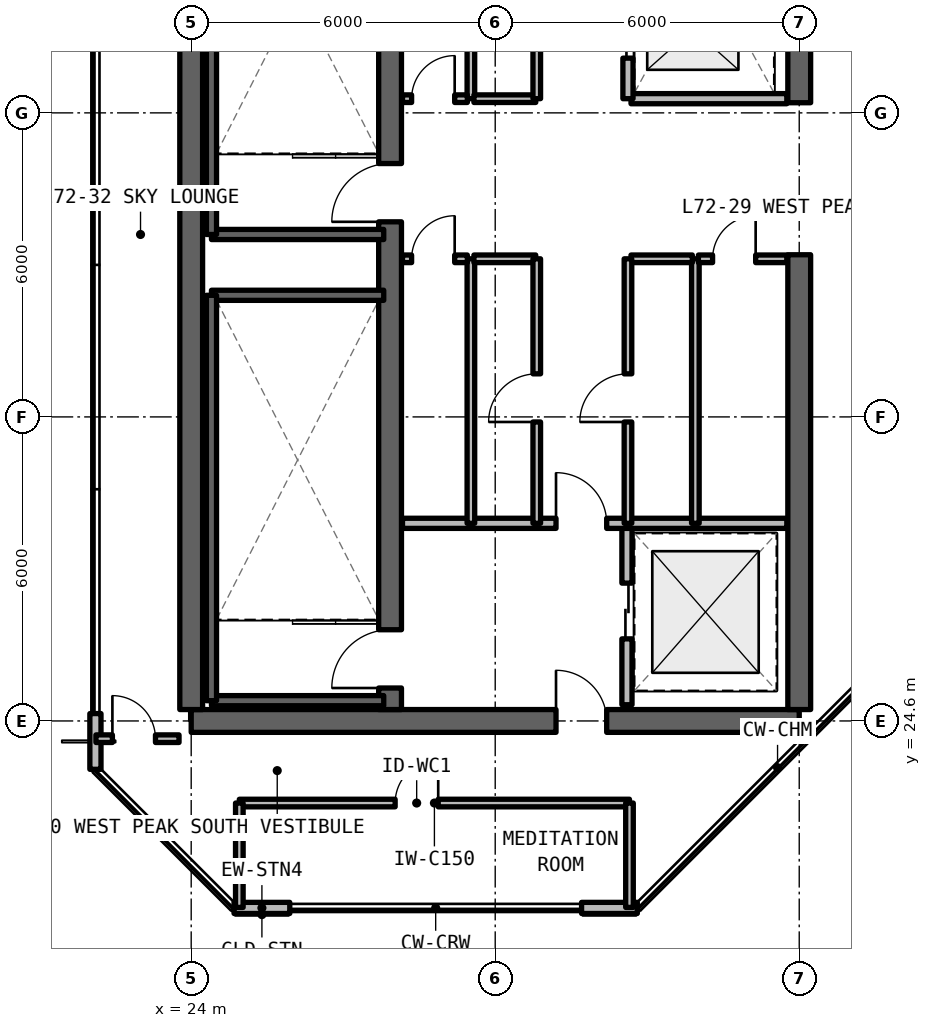
"""IFC4 building model, lengths in metres.
Left out: names, types, materials, properties, quantities, classifications, styles, units other than length and angle.
Written with IfcOpenShell. Run it as: python <this file> out.ifc"""

import sys

from ifc_helpers import new_model, si_unit, direction, frame, frame_2d, origin, place, context, subcontext, project, spatial, rectangle, extrude, element, fill, save


model = new_model("IFC4")
c1 = context("Model", 3, precision=1e-05, world=origin(), true_north=direction((0.0, 1.0)))
c2 = subcontext(c1, "Body", "Model", "MODEL_VIEW")
j1 = project(units=[si_unit("LENGTHUNIT", "METRE"), si_unit("PLANEANGLEUNIT", "RADIAN")], contexts=[c1])
p1 = place(None, origin())
s1 = spatial("IfcSite", under=j1, at=p1, CompositionType="ELEMENT")
p2 = place(p1, origin())
s2 = spatial("IfcBuilding", under=s1, at=p2, CompositionType="ELEMENT")
p3 = place(p2, frame((0.0, 0.0, 257.07)))
s3 = spatial("IfcBuildingStorey", under=s2, at=p3, CompositionType="ELEMENT", Elevation=257.07)
p4 = place(p3, frame((24.0, 24.6, 0.0), z_axis=(0.0, 0.0, 1.0), x_axis=(1.0, 0.0, 0.0)))
e1 = element("IfcWall", 1, at=p4, inside=s3, PredefinedType="SHEAR", context=c2, shape_type="SweptSolid", body=[
    extrude(rectangle(XDim=12.0, YDim=0.45, at=frame_2d((6.0, 0.0))), origin(), (0.0, 0.0, 1.0), 3.37),
])
p5 = place(p4, frame((7.2, 0.0, 0.0)))
e2 = element("IfcOpeningElement", 2, at=p5, cuts=e1, PredefinedType="OPENING", context=c2, shape_type="SweptSolid", body=[
    extrude(rectangle(XDim=1.0, YDim=2.15, at=frame_2d((0.5, 1.075))), frame((0.0, 0.235, 0.0), z_axis=(0.0, -1.0, 0.0), x_axis=(1.0, 0.0, 0.0)), (0.0, 0.0, 1.0), 0.47),
])
p6 = place(p3, frame((24.0, 24.825, 0.0), z_axis=(0.0, 0.0, 1.0), x_axis=(0.0, 1.0, 0.0)))
e3 = element("IfcWall", 3, at=p6, inside=s3, PredefinedType="SHEAR", context=c2, shape_type="SweptSolid", body=[
    extrude(rectangle(XDim=17.55, YDim=0.45, at=frame_2d((8.775, 0.0))), origin(), (0.0, 0.0, 1.0), 3.37),
])
p7 = place(p3, frame((36.0, 24.825, 0.0), z_axis=(0.0, 0.0, 1.0), x_axis=(0.0, 1.0, 0.0)))
e4 = element("IfcWall", 4, at=p7, inside=s3, PredefinedType="SHEAR", context=c2, shape_type="SweptSolid", body=[
    extrude(rectangle(XDim=8.975, YDim=0.45, at=frame_2d((4.488, 0.0))), origin(), (0.0, 0.0, 1.0), 3.37),
])
p8 = place(p3, frame((36.0, 36.8, 0.0), z_axis=(0.0, 0.0, 1.0), x_axis=(0.0, 1.0, 0.0)))
e5 = element("IfcWall", 5, at=p8, inside=s3, PredefinedType="SHEAR", context=c2, shape_type="SweptSolid", body=[
    extrude(rectangle(XDim=5.575, YDim=0.45, at=frame_2d((2.788, 0.0))), origin(), (0.0, 0.0, 1.0), 3.37),
])
p9 = place(p3, frame((27.925, 24.825, 0.0), z_axis=(0.0, 0.0, 1.0), x_axis=(0.0, 1.0, 0.0)))
e6 = element("IfcWall", 6, at=p9, inside=s3, PredefinedType="SHEAR", context=c2, shape_type="SweptSolid", body=[
    extrude(rectangle(XDim=17.55, YDim=0.45, at=frame_2d((8.775, 0.0))), origin(), (0.0, 0.0, 1.0), 3.37),
])
p10 = place(p9, frame((0.425, 0.0, 0.0)))
e7 = element("IfcOpeningElement", 7, at=p10, cuts=e6, PredefinedType="OPENING", context=c2, shape_type="SweptSolid", body=[
    extrude(rectangle(XDim=1.15, YDim=2.15, at=frame_2d((0.575, 1.075))), frame((0.0, 0.235, 0.0), z_axis=(0.0, -1.0, 0.0), x_axis=(1.0, 0.0, 0.0)), (0.0, 0.0, 1.0), 0.47),
])
p11 = place(p9, frame((9.625, 0.0, 0.0)))
e8 = element("IfcOpeningElement", 8, at=p11, cuts=e6, PredefinedType="OPENING", context=c2, shape_type="SweptSolid", body=[
    extrude(rectangle(XDim=1.15, YDim=2.15, at=frame_2d((0.575, 1.075))), frame((0.0, 0.235, 0.0), z_axis=(0.0, -1.0, 0.0), x_axis=(1.0, 0.0, 0.0)), (0.0, 0.0, 1.0), 0.47),
])
p12 = place(p3, frame((24.846, 20.91, 0.0), z_axis=(0.0, 0.0, 1.0), x_axis=(1.0, 0.0, 0.0)))
e9 = element("IfcWall", 9, at=p12, inside=s3, PredefinedType="SOLIDWALL", context=c2, shape_type="SweptSolid", body=[
    extrude(rectangle(XDim=1.1, YDim=0.22, at=frame_2d((0.55, 0.0))), origin(), (0.0, 0.0, 1.0), 3.41),
])
for number, where, z_axis, x_axis in (
    (10, (31.704, 20.91, 0.0), (0.0, 0.0, 1.0), (1.0, 0.0, 0.0)),
    (11, (22.11, 24.746, 0.0), (0.0, 0.0, 1.0), (0.0, -1.0, 0.0)),
):
    element("IfcWall", number, at=place(p3, frame(where, z_axis=z_axis, x_axis=x_axis)), inside=s3, PredefinedType="SOLIDWALL", context=c2, shape_type="SweptSolid", body=[
        extrude(rectangle(XDim=1.1, YDim=0.22, at=frame_2d((0.55, 0.0))), origin(), (0.0, 0.0, 1.0), 3.41),
    ])
p13 = place(p3, frame((32.6, 24.92, 0.0), z_axis=(0.0, 0.0, 1.0), x_axis=(0.0, 1.0, 0.0)))
e12 = element("IfcWall", 12, at=p13, inside=s3, PredefinedType="SOLIDWALL", context=c2, shape_type="SweptSolid", body=[
    extrude(rectangle(XDim=3.58, YDim=0.2, at=frame_2d((1.79, 0.0))), origin(), (0.0, 0.0, 1.0), 2.63),
])
p14 = place(p13, frame((1.3, 0.0, 0.0)))
e13 = element("IfcOpeningElement", 13, at=p14, cuts=e12, PredefinedType="OPENING", context=c2, shape_type="SweptSolid", body=[
    extrude(rectangle(XDim=1.1, YDim=2.2, at=frame_2d((0.55, 1.1))), frame((0.0, 0.11, 0.0), z_axis=(0.0, -1.0, 0.0), x_axis=(1.0, 0.0, 0.0)), (0.0, 0.0, 1.0), 0.22),
])
p15 = place(p3, frame((28.17, 28.5, 0.0), z_axis=(0.0, 0.0, 1.0), x_axis=(1.0, 0.0, 0.0)))
e14 = element("IfcWall", 14, at=p15, inside=s3, PredefinedType="SOLIDWALL", context=c2, shape_type="SweptSolid", body=[
    extrude(rectangle(XDim=7.585, YDim=0.2, at=frame_2d((3.792, 0.0))), origin(), (0.0, 0.0, 1.0), 2.63),
])
p16 = place(p15, frame((3.03, 0.0, 0.0)))
e15 = element("IfcOpeningElement", 15, at=p16, cuts=e14, PredefinedType="OPENING", context=c2, shape_type="SweptSolid", body=[
    extrude(rectangle(XDim=1.0, YDim=2.15, at=frame_2d((0.5, 1.075))), frame((0.0, 0.11, 0.0), z_axis=(0.0, -1.0, 0.0), x_axis=(1.0, 0.0, 0.0)), (0.0, 0.0, 1.0), 0.22),
])
p17 = place(p3, frame((29.52, 28.5, 0.0), z_axis=(0.0, 0.0, 1.0), x_axis=(0.0, 1.0, 0.0)))
e16 = element("IfcWall", 16, at=p17, inside=s3, PredefinedType="SOLIDWALL", context=c2, shape_type="SweptSolid", body=[
    extrude(rectangle(XDim=5.22, YDim=0.15, at=frame_2d((2.61, 0.0))), origin(), (0.0, 0.0, 1.0), 2.63),
])
p18 = place(p3, frame((28.17, 33.72, 0.0), z_axis=(0.0, 0.0, 1.0), x_axis=(1.0, 0.0, 0.0)))
e17 = element("IfcWall", 17, at=p18, inside=s3, PredefinedType="SOLIDWALL", context=c2, shape_type="SweptSolid", body=[
    extrude(rectangle(XDim=1.28, YDim=0.15, at=frame_2d((0.64, 0.0))), origin(), (0.0, 0.0, 1.0), 2.63),
])
p19 = place(p18, frame((0.18, 0.0, 0.0)))
e18 = element("IfcOpeningElement", 18, at=p19, cuts=e17, PredefinedType="OPENING", context=c2, shape_type="SweptSolid", body=[
    extrude(rectangle(XDim=0.85, YDim=2.1, at=frame_2d((0.425, 1.05))), frame((0.0, 0.085, 0.0), z_axis=(0.0, -1.0, 0.0), x_axis=(1.0, 0.0, 0.0)), (0.0, 0.0, 1.0), 0.17),
])
p20 = place(p3, frame((29.58, 33.72, 0.0), z_axis=(0.0, 0.0, 1.0), x_axis=(1.0, 0.0, 0.0)))
e19 = element("IfcWall", 19, at=p20, inside=s3, PredefinedType="SOLIDWALL", context=c2, shape_type="SweptSolid", body=[
    extrude(rectangle(XDim=1.22, YDim=0.15, at=frame_2d((0.61, 0.0))), origin(), (0.0, 0.0, 1.0), 2.63),
])
p21 = place(p3, frame((30.82, 28.5, 0.0), z_axis=(0.0, 0.0, 1.0), x_axis=(0.0, 1.0, 0.0)))
e20 = element("IfcWall", 20, at=p21, inside=s3, PredefinedType="SOLIDWALL", context=c2, shape_type="SweptSolid", body=[
    extrude(rectangle(XDim=5.22, YDim=0.15, at=frame_2d((2.61, 0.0))), origin(), (0.0, 0.0, 1.0), 2.63),
])
p22 = place(p21, frame((2.0, 0.0, 0.0)))
e21 = element("IfcOpeningElement", 21, at=p22, cuts=e20, PredefinedType="OPENING", context=c2, shape_type="SweptSolid", body=[
    extrude(rectangle(XDim=0.95, YDim=2.15, at=frame_2d((0.475, 1.075))), frame((0.0, 0.085, 0.0), z_axis=(0.0, -1.0, 0.0), x_axis=(1.0, 0.0, 0.0)), (0.0, 0.0, 1.0), 0.17),
])
p23 = place(p3, frame((33.95, 28.5, 0.0), z_axis=(0.0, 0.0, 1.0), x_axis=(0.0, 1.0, 0.0)))
e22 = element("IfcWall", 22, at=p23, inside=s3, PredefinedType="SOLIDWALL", context=c2, shape_type="SweptSolid", body=[
    extrude(rectangle(XDim=5.22, YDim=0.15, at=frame_2d((2.61, 0.0))), origin(), (0.0, 0.0, 1.0), 2.63),
])
p24 = place(p3, frame((32.68, 33.72, 0.0), z_axis=(0.0, 0.0, 1.0), x_axis=(1.0, 0.0, 0.0)))
e23 = element("IfcWall", 23, at=p24, inside=s3, PredefinedType="SOLIDWALL", context=c2, shape_type="SweptSolid", body=[
    extrude(rectangle(XDim=1.21, YDim=0.15, at=frame_2d((0.605, 0.0))), origin(), (0.0, 0.0, 1.0), 2.63),
])
p25 = place(p3, frame((34.01, 33.72, 0.0), z_axis=(0.0, 0.0, 1.0), x_axis=(1.0, 0.0, 0.0)))
e24 = element("IfcWall", 24, at=p25, inside=s3, PredefinedType="SOLIDWALL", context=c2, shape_type="SweptSolid", body=[
    extrude(rectangle(XDim=1.745, YDim=0.15, at=frame_2d((0.873, 0.0))), origin(), (0.0, 0.0, 1.0), 2.63),
])
p26 = place(p25, frame((0.28, 0.0, 0.0)))
e25 = element("IfcOpeningElement", 25, at=p26, cuts=e24, PredefinedType="OPENING", context=c2, shape_type="SweptSolid", body=[
    extrude(rectangle(XDim=0.85, YDim=2.1, at=frame_2d((0.425, 1.05))), frame((0.0, 0.085, 0.0), z_axis=(0.0, -1.0, 0.0), x_axis=(1.0, 0.0, 0.0)), (0.0, 0.0, 1.0), 0.17),
])
p27 = place(p3, frame((32.62, 28.5, 0.0), z_axis=(0.0, 0.0, 1.0), x_axis=(0.0, 1.0, 0.0)))
e26 = element("IfcWall", 26, at=p27, inside=s3, PredefinedType="SOLIDWALL", context=c2, shape_type="SweptSolid", body=[
    extrude(rectangle(XDim=5.22, YDim=0.15, at=frame_2d((2.61, 0.0))), origin(), (0.0, 0.0, 1.0), 2.63),
])
p28 = place(p27, frame((2.0, 0.0, 0.0)))
e27 = element("IfcOpeningElement", 27, at=p28, cuts=e26, PredefinedType="OPENING", context=c2, shape_type="SweptSolid", body=[
    extrude(rectangle(XDim=0.95, YDim=2.15, at=frame_2d((0.475, 1.075))), frame((0.0, 0.085, 0.0), z_axis=(0.0, -1.0, 0.0), x_axis=(1.0, 0.0, 0.0)), (0.0, 0.0, 1.0), 0.17),
])
p29 = place(p3, frame((29.52, 36.88, 0.0), z_axis=(0.0, 0.0, 1.0), x_axis=(0.0, 1.0, 0.0)))
e28 = element("IfcWall", 28, at=p29, inside=s3, PredefinedType="SOLIDWALL", context=c2, shape_type="SweptSolid", body=[
    extrude(rectangle(XDim=5.42, YDim=0.15, at=frame_2d((2.71, 0.0))), origin(), (0.0, 0.0, 1.0), 2.63),
])
p30 = place(p3, frame((28.17, 36.88, 0.0), z_axis=(0.0, 0.0, 1.0), x_axis=(1.0, 0.0, 0.0)))
e29 = element("IfcWall", 29, at=p30, inside=s3, PredefinedType="SOLIDWALL", context=c2, shape_type="SweptSolid", body=[
    extrude(rectangle(XDim=1.28, YDim=0.15, at=frame_2d((0.64, 0.0))), origin(), (0.0, 0.0, 1.0), 2.63),
])
p31 = place(p30, frame((0.18, 0.0, 0.0)))
e30 = element("IfcOpeningElement", 30, at=p31, cuts=e29, PredefinedType="OPENING", context=c2, shape_type="SweptSolid", body=[
    extrude(rectangle(XDim=0.85, YDim=2.1, at=frame_2d((0.425, 1.05))), frame((0.0, 0.085, 0.0), z_axis=(0.0, -1.0, 0.0), x_axis=(1.0, 0.0, 0.0)), (0.0, 0.0, 1.0), 0.17),
])
p32 = place(p3, frame((29.58, 36.88, 0.0), z_axis=(0.0, 0.0, 1.0), x_axis=(1.0, 0.0, 0.0)))
e31 = element("IfcWall", 31, at=p32, inside=s3, PredefinedType="SOLIDWALL", context=c2, shape_type="SweptSolid", body=[
    extrude(rectangle(XDim=1.22, YDim=0.15, at=frame_2d((0.61, 0.0))), origin(), (0.0, 0.0, 1.0), 2.63),
])
p33 = place(p3, frame((30.82, 36.88, 0.0), z_axis=(0.0, 0.0, 1.0), x_axis=(0.0, 1.0, 0.0)))
e32 = element("IfcWall", 32, at=p33, inside=s3, PredefinedType="SOLIDWALL", context=c2, shape_type="SweptSolid", body=[
    extrude(rectangle(XDim=5.42, YDim=0.15, at=frame_2d((2.71, 0.0))), origin(), (0.0, 0.0, 1.0), 2.63),
])
p34 = place(p33, frame((2.1, 0.0, 0.0)))
e33 = element("IfcOpeningElement", 33, at=p34, cuts=e32, PredefinedType="OPENING", context=c2, shape_type="SweptSolid", body=[
    extrude(rectangle(XDim=0.95, YDim=2.15, at=frame_2d((0.475, 1.075))), frame((0.0, 0.085, 0.0), z_axis=(0.0, -1.0, 0.0), x_axis=(1.0, 0.0, 0.0)), (0.0, 0.0, 1.0), 0.17),
])
p35 = place(p3, frame((32.68, 36.88, 0.0), z_axis=(0.0, 0.0, 1.0), x_axis=(1.0, 0.0, 0.0)))
e34 = element("IfcWall", 34, at=p35, inside=s3, PredefinedType="SOLIDWALL", context=c2, shape_type="SweptSolid", body=[
    extrude(rectangle(XDim=3.075, YDim=0.2, at=frame_2d((1.538, 0.0))), origin(), (0.0, 0.0, 1.0), 2.63),
])
p36 = place(p3, frame((32.62, 36.88, 0.0), z_axis=(0.0, 0.0, 1.0), x_axis=(0.0, 1.0, 0.0)))
e35 = element("IfcWall", 35, at=p36, inside=s3, PredefinedType="SOLIDWALL", context=c2, shape_type="SweptSolid", body=[
    extrude(rectangle(XDim=5.42, YDim=0.2, at=frame_2d((2.71, 0.0))), origin(), (0.0, 0.0, 1.0), 2.63),
])
p37 = place(p36, frame((0.8, 0.0, 0.0)))
e36 = element("IfcOpeningElement", 36, at=p37, cuts=e35, PredefinedType="OPENING", context=c2, shape_type="SweptSolid", body=[
    extrude(rectangle(XDim=1.1, YDim=2.2, at=frame_2d((0.55, 1.1))), frame((0.0, 0.11, 0.0), z_axis=(0.0, -1.0, 0.0), x_axis=(1.0, 0.0, 0.0)), (0.0, 0.0, 1.0), 0.22),
])
p38 = place(p36, frame((3.3, 0.0, 0.0)))
e37 = element("IfcOpeningElement", 37, at=p38, cuts=e35, PredefinedType="OPENING", context=c2, shape_type="SweptSolid", body=[
    extrude(rectangle(XDim=1.1, YDim=2.2, at=frame_2d((0.55, 1.1))), frame((0.0, 0.11, 0.0), z_axis=(0.0, -1.0, 0.0), x_axis=(1.0, 0.0, 0.0)), (0.0, 0.0, 1.0), 0.22),
])
p39 = place(p3, frame((24.95, 22.98, 0.0), z_axis=(0.0, 0.0, 1.0), x_axis=(1.0, 0.0, 0.0)))
e38 = element("IfcWall", 38, at=p39, inside=s3, PredefinedType="SOLIDWALL", context=c2, shape_type="SweptSolid", body=[
    extrude(rectangle(XDim=7.7, YDim=0.15, at=frame_2d((3.85, 0.0))), origin(), (0.0, 0.0, 1.0), 2.63),
])
p40 = place(p39, frame((3.075, 0.0, 0.0)))
e39 = element("IfcOpeningElement", 39, at=p40, cuts=e38, PredefinedType="OPENING", context=c2, shape_type="SweptSolid", body=[
    extrude(rectangle(XDim=0.85, YDim=2.1, at=frame_2d((0.425, 1.05))), frame((0.0, 0.085, 0.0), z_axis=(0.0, -1.0, 0.0), x_axis=(1.0, 0.0, 0.0)), (0.0, 0.0, 1.0), 0.17),
])
for number, where, z_axis, x_axis in (
    (40, (24.95, 20.92, 0.0), (0.0, 0.0, 1.0), (0.0, 1.0, 0.0)),
    (41, (32.65, 20.92, 0.0), (0.0, 0.0, 1.0), (0.0, 1.0, 0.0)),
):
    element("IfcWall", number, at=place(p3, frame(where, z_axis=z_axis, x_axis=x_axis)), inside=s3, PredefinedType="SOLIDWALL", context=c2, shape_type="SweptSolid", body=[
        extrude(rectangle(XDim=2.06, YDim=0.15, at=frame_2d((1.03, 0.0))), origin(), (0.0, 0.0, 1.0), 2.63),
    ])
p41 = place(p3, frame((22.12, 24.25, 0.0), z_axis=(0.0, 0.0, 1.0), x_axis=(1.0, 0.0, 0.0)))
e42 = element("IfcWall", 42, at=p41, inside=s3, PredefinedType="SOLIDWALL", context=c2, shape_type="SweptSolid", body=[
    extrude(rectangle(XDim=1.64, YDim=0.15, at=frame_2d((0.82, 0.0))), origin(), (0.0, 0.0, 1.0), 2.63),
])
p42 = place(p41, frame((0.325, 0.0, 0.0)))
e43 = element("IfcOpeningElement", 43, at=p42, cuts=e42, PredefinedType="OPENING", context=c2, shape_type="SweptSolid", body=[
    extrude(rectangle(XDim=0.85, YDim=2.1, at=frame_2d((0.425, 1.05))), frame((0.0, 0.085, 0.0), z_axis=(0.0, -1.0, 0.0), x_axis=(1.0, 0.0, 0.0)), (0.0, 0.0, 1.0), 0.17),
])
for number, where, z_axis, x_axis in (
    (44, (24.4, 25.0, 0.0), (0.0, 0.0, 1.0), (1.0, 0.0, 0.0)),
    (45, (27.8, 33.0, 0.0), (0.0, 0.0, 1.0), (-1.0, 0.0, 0.0)),
):
    element("IfcWall", number, at=place(p3, frame(where, z_axis=z_axis, x_axis=x_axis)), inside=s3, PredefinedType="SOLIDWALL", context=c2, shape_type="SweptSolid", body=[
        extrude(rectangle(XDim=3.4, YDim=0.2, at=frame_2d((1.7, 0.0))), origin(), (0.0, 0.0, 1.0), 3.63),
    ])
p43 = place(p3, frame((24.4, 33.0, 0.0), z_axis=(0.0, 0.0, 1.0), x_axis=(0.0, -1.0, 0.0)))
e46 = element("IfcWall", 46, at=p43, inside=s3, PredefinedType="SOLIDWALL", context=c2, shape_type="SweptSolid", body=[
    extrude(rectangle(XDim=8.0, YDim=0.2, at=frame_2d((4.0, 0.0))), origin(), (0.0, 0.0, 1.0), 3.63),
])
p44 = place(p3, frame((24.4, 34.2, 0.0), z_axis=(0.0, 0.0, 1.0), x_axis=(1.0, 0.0, 0.0)))
e47 = element("IfcWall", 47, at=p44, inside=s3, PredefinedType="SOLIDWALL", context=c2, shape_type="SweptSolid", body=[
    extrude(rectangle(XDim=3.4, YDim=0.2, at=frame_2d((1.7, 0.0))), origin(), (0.0, 0.0, 1.0), 3.63),
])
p45 = place(p3, frame((24.4, 42.2, 0.0), z_axis=(0.0, 0.0, 1.0), x_axis=(0.0, -1.0, 0.0)))
e48 = element("IfcWall", 48, at=p45, inside=s3, PredefinedType="SOLIDWALL", context=c2, shape_type="SweptSolid", body=[
    extrude(rectangle(XDim=8.0, YDim=0.2, at=frame_2d((4.0, 0.0))), origin(), (0.0, 0.0, 1.0), 3.63),
])
p46 = place(p14, origin())
e49 = element("IfcDoor", 49, at=p46, inside=s3, OperationType="SLIDING_TO_LEFT", PredefinedType="DOOR", context=c2, shape_type="SweptSolid", body=[
    extrude(rectangle(XDim=1.1, YDim=2.2, at=frame_2d((0.55, 1.1))), frame((0.0, 0.025, 0.0), z_axis=(0.0, -1.0, 0.0), x_axis=(1.0, 0.0, 0.0)), (0.0, 0.0, 1.0), 0.05),
])
fill(e13, e49)
p47 = place(p16, origin())
e50 = element("IfcDoor", 50, at=p47, inside=s3, OperationType="SINGLE_SWING_LEFT", PredefinedType="DOOR", context=c2, shape_type="SweptSolid", body=[
    extrude(rectangle(XDim=1.0, YDim=2.15, at=frame_2d((0.5, 1.075))), frame((0.0, 0.025, 0.0), z_axis=(0.0, -1.0, 0.0), x_axis=(1.0, 0.0, 0.0)), (0.0, 0.0, 1.0), 0.05),
])
fill(e15, e50)
p48 = place(p19, origin())
e51 = element("IfcDoor", 51, at=p48, inside=s3, OperationType="SINGLE_SWING_RIGHT", PredefinedType="DOOR", context=c2, shape_type="SweptSolid", body=[
    extrude(rectangle(XDim=0.85, YDim=2.1, at=frame_2d((0.425, 1.05))), frame((0.0, 0.025, 0.0), z_axis=(0.0, -1.0, 0.0), x_axis=(1.0, 0.0, 0.0)), (0.0, 0.0, 1.0), 0.05),
])
fill(e18, e51)
p49 = place(p22, origin())
e52 = element("IfcDoor", 52, at=p49, inside=s3, OperationType="SINGLE_SWING_LEFT", PredefinedType="DOOR", context=c2, shape_type="SweptSolid", body=[
    extrude(rectangle(XDim=0.95, YDim=2.15, at=frame_2d((0.475, 1.075))), frame((0.0, 0.025, 0.0), z_axis=(0.0, -1.0, 0.0), x_axis=(1.0, 0.0, 0.0)), (0.0, 0.0, 1.0), 0.05),
])
fill(e21, e52)
p50 = place(p26, origin())
e53 = element("IfcDoor", 53, at=p50, inside=s3, OperationType="SINGLE_SWING_RIGHT", PredefinedType="DOOR", context=c2, shape_type="SweptSolid", body=[
    extrude(rectangle(XDim=0.85, YDim=2.1, at=frame_2d((0.425, 1.05))), frame((0.0, 0.025, 0.0), z_axis=(0.0, -1.0, 0.0), x_axis=(1.0, 0.0, 0.0)), (0.0, 0.0, 1.0), 0.05),
])
fill(e25, e53)
p51 = place(p28, origin())
e54 = element("IfcDoor", 54, at=p51, inside=s3, OperationType="SINGLE_SWING_LEFT", PredefinedType="DOOR", context=c2, shape_type="SweptSolid", body=[
    extrude(rectangle(XDim=0.95, YDim=2.15, at=frame_2d((0.475, 1.075))), frame((0.0, 0.025, 0.0), z_axis=(0.0, -1.0, 0.0), x_axis=(1.0, 0.0, 0.0)), (0.0, 0.0, 1.0), 0.05),
])
fill(e27, e54)
p52 = place(p31, origin())
e55 = element("IfcDoor", 55, at=p52, inside=s3, OperationType="SINGLE_SWING_RIGHT", PredefinedType="DOOR", context=c2, shape_type="SweptSolid", body=[
    extrude(rectangle(XDim=0.85, YDim=2.1, at=frame_2d((0.425, 1.05))), frame((0.0, 0.025, 0.0), z_axis=(0.0, -1.0, 0.0), x_axis=(1.0, 0.0, 0.0)), (0.0, 0.0, 1.0), 0.05),
])
fill(e30, e55)
p53 = place(p37, origin())
e56 = element("IfcDoor", 56, at=p53, inside=s3, OperationType="SLIDING_TO_LEFT", PredefinedType="DOOR", context=c2, shape_type="SweptSolid", body=[
    extrude(rectangle(XDim=1.1, YDim=2.2, at=frame_2d((0.55, 1.1))), frame((0.0, 0.025, 0.0), z_axis=(0.0, -1.0, 0.0), x_axis=(1.0, 0.0, 0.0)), (0.0, 0.0, 1.0), 0.05),
])
fill(e36, e56)
p54 = place(p40, origin())
e57 = element("IfcDoor", 57, at=p54, inside=s3, OperationType="SINGLE_SWING_RIGHT", PredefinedType="DOOR", context=c2, shape_type="SweptSolid", body=[
    extrude(rectangle(XDim=0.85, YDim=2.1, at=frame_2d((0.425, 1.05))), frame((0.0, 0.025, 0.0), z_axis=(0.0, -1.0, 0.0), x_axis=(1.0, 0.0, 0.0)), (0.0, 0.0, 1.0), 0.05),
])
fill(e39, e57)
p55 = place(p42, origin())
e58 = element("IfcDoor", 58, at=p55, inside=s3, OperationType="SINGLE_SWING_LEFT", PredefinedType="DOOR", context=c2, shape_type="SweptSolid", body=[
    extrude(rectangle(XDim=0.85, YDim=2.1, at=frame_2d((0.425, 1.05))), frame((0.0, 0.025, 0.0), z_axis=(0.0, -1.0, 0.0), x_axis=(1.0, 0.0, 0.0)), (0.0, 0.0, 1.0), 0.05),
])
fill(e43, e58)
p56 = place(p10, origin())
e59 = element("IfcDoor", 59, at=p56, inside=s3, OperationType="SINGLE_SWING_LEFT", PredefinedType="DOOR", context=c2, shape_type="SweptSolid", body=[
    extrude(rectangle(XDim=1.15, YDim=2.15, at=frame_2d((0.575, 1.075))), frame((0.0, 0.025, 0.0), z_axis=(0.0, -1.0, 0.0), x_axis=(1.0, 0.0, 0.0)), (0.0, 0.0, 1.0), 0.05),
])
fill(e7, e59)
p57 = place(p11, origin())
e60 = element("IfcDoor", 60, at=p57, inside=s3, OperationType="SINGLE_SWING_RIGHT", PredefinedType="DOOR", context=c2, shape_type="SweptSolid", body=[
    extrude(rectangle(XDim=1.15, YDim=2.15, at=frame_2d((0.575, 1.075))), frame((0.0, 0.025, 0.0), z_axis=(0.0, -1.0, 0.0), x_axis=(1.0, 0.0, 0.0)), (0.0, 0.0, 1.0), 0.05),
])
fill(e8, e60)
p58 = place(p5, origin())
e61 = element("IfcDoor", 61, at=p58, inside=s3, OperationType="SINGLE_SWING_LEFT", PredefinedType="DOOR", context=c2, shape_type="SweptSolid", body=[
    extrude(rectangle(XDim=1.0, YDim=2.15, at=frame_2d((0.5, 1.075))), frame((0.0, 0.025, 0.0), z_axis=(0.0, -1.0, 0.0), x_axis=(1.0, 0.0, 0.0)), (0.0, 0.0, 1.0), 0.05),
])
fill(e2, e61)
save(model, sys.argv[1])
